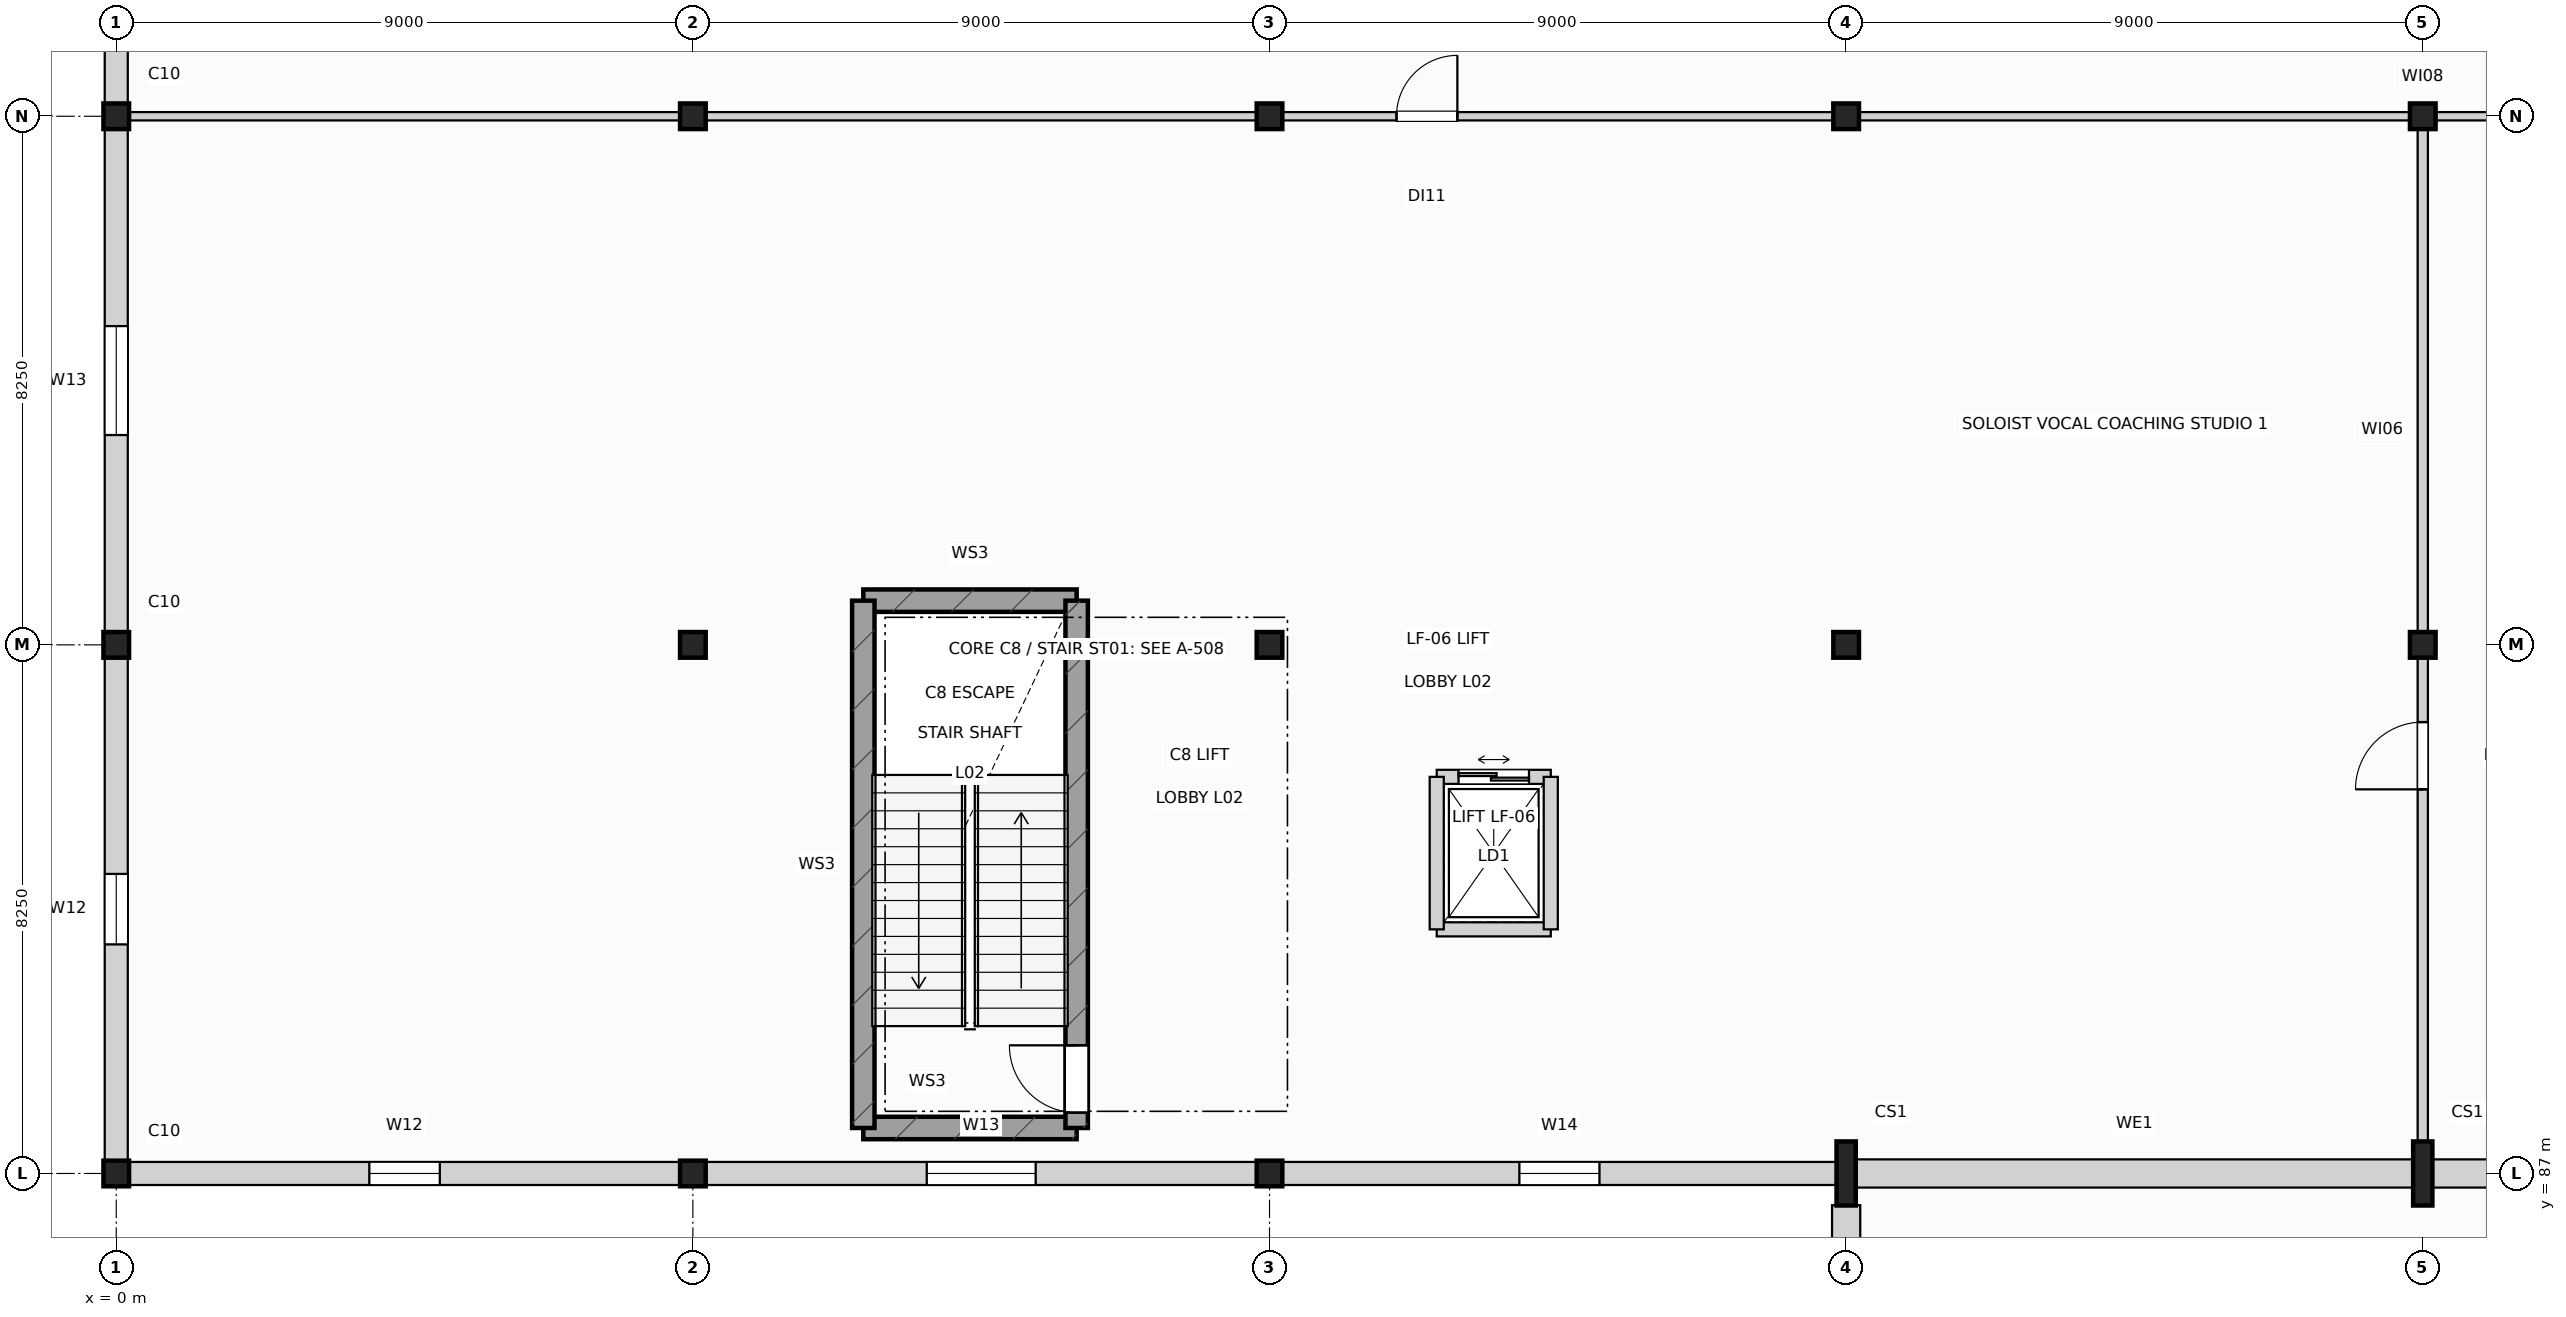
"""IFC4 building model, lengths in metres.
Left out: names, types, materials, properties, quantities, classifications, styles, units other than length and angle.
Written with IfcOpenShell. Run it as: python <this file> out.ifc"""

import sys

from ifc_helpers import new_model, si_unit, direction, frame, frame_2d, origin, origin_2d, place, context, subcontext, project, spatial, rectangle, i_section, extrude, element, fill, save


model = new_model("IFC4")
c1 = context("Model", 3, precision=1e-05, world=origin(), true_north=direction((0.0, 1.0)))
c2 = subcontext(c1, "Body", "Model", "MODEL_VIEW")
j1 = project(units=[si_unit("LENGTHUNIT", "METRE"), si_unit("PLANEANGLEUNIT", "RADIAN")], contexts=[c1])
p1 = place(None, origin())
s1 = spatial("IfcSite", under=j1, at=p1, CompositionType="ELEMENT")
p2 = place(p1, origin())
s2 = spatial("IfcBuilding", under=s1, at=p2, CompositionType="ELEMENT")
p3 = place(p2, frame((0.0, 0.0, 11.4)))
s3 = spatial("IfcBuildingStorey", under=s2, at=p3, CompositionType="ELEMENT", Elevation=11.4)
for number, where, z_axis, x_axis in (
    (1, (0.0, 87.0, 0.0), (0.0, 0.0, 1.0), (1.0, 0.0, 0.0)),
    (2, (0.0, 95.25, 0.0), (0.0, 0.0, 1.0), (1.0, 0.0, 0.0)),
    (3, (0.0, 103.5, 0.0), (0.0, 0.0, 1.0), (1.0, 0.0, 0.0)),
    (4, (9.0, 87.0, 0.0), (0.0, 0.0, 1.0), (1.0, 0.0, 0.0)),
    (5, (9.0, 95.25, 0.0), (0.0, 0.0, 1.0), (1.0, 0.0, 0.0)),
    (6, (9.0, 103.5, 0.0), (0.0, 0.0, 1.0), (1.0, 0.0, 0.0)),
    (7, (18.0, 87.0, 0.0), (0.0, 0.0, 1.0), (1.0, 0.0, 0.0)),
    (8, (18.0, 95.25, 0.0), (0.0, 0.0, 1.0), (1.0, 0.0, 0.0)),
    (9, (18.0, 103.5, 0.0), (0.0, 0.0, 1.0), (1.0, 0.0, 0.0)),
):
    element("IfcColumn", number, at=place(p3, frame(where, z_axis=z_axis, x_axis=x_axis)), inside=s3, PredefinedType="COLUMN", context=c2, shape_type="SweptSolid", body=[
        extrude(rectangle(XDim=0.4, YDim=0.4, at=origin_2d()), origin(), (0.0, 0.0, 1.0), 5.4),
    ])
p4 = place(p3, frame((27.0, 87.0, 0.0), z_axis=(0.0, 0.0, 1.0), x_axis=(1.0, 0.0, 0.0)))
e10 = element("IfcColumn", 10, at=p4, inside=s3, PredefinedType="COLUMN", context=c2, shape_type="SweptSolid", body=[
    extrude(i_section(OverallWidth=0.3, OverallDepth=1.0, WebThickness=0.019, FlangeThickness=0.036, at=origin_2d()), origin(), (0.0, 0.0, 1.0), 5.4),
])
for number, where, z_axis, x_axis in (
    (11, (27.0, 95.25, 0.0), (0.0, 0.0, 1.0), (1.0, 0.0, 0.0)),
    (12, (27.0, 103.5, 0.0), (0.0, 0.0, 1.0), (1.0, 0.0, 0.0)),
):
    element("IfcColumn", number, at=place(p3, frame(where, z_axis=z_axis, x_axis=x_axis)), inside=s3, PredefinedType="COLUMN", context=c2, shape_type="SweptSolid", body=[
        extrude(rectangle(XDim=0.4, YDim=0.4, at=origin_2d()), origin(), (0.0, 0.0, 1.0), 5.4),
    ])
p5 = place(p3, frame((36.0, 87.0, 0.0), z_axis=(0.0, 0.0, 1.0), x_axis=(1.0, 0.0, 0.0)))
e13 = element("IfcColumn", 13, at=p5, inside=s3, PredefinedType="COLUMN", context=c2, shape_type="SweptSolid", body=[
    extrude(i_section(OverallWidth=0.3, OverallDepth=1.0, WebThickness=0.019, FlangeThickness=0.036, at=origin_2d()), origin(), (0.0, 0.0, 1.0), 5.4),
])
for number, where, z_axis, x_axis in (
    (14, (36.0, 95.25, 0.0), (0.0, 0.0, 1.0), (1.0, 0.0, 0.0)),
    (15, (36.0, 103.5, 0.0), (0.0, 0.0, 1.0), (1.0, 0.0, 0.0)),
):
    element("IfcColumn", number, at=place(p3, frame(where, z_axis=z_axis, x_axis=x_axis)), inside=s3, PredefinedType="COLUMN", context=c2, shape_type="SweptSolid", body=[
        extrude(rectangle(XDim=0.4, YDim=0.4, at=origin_2d()), origin(), (0.0, 0.0, 1.0), 5.4),
    ])
p6 = place(p3, frame((27.145, 87.0, 0.0), z_axis=(0.0, 0.0, 1.0), x_axis=(1.0, 0.0, 0.0)))
e16 = element("IfcWall", 16, at=p6, inside=s3, PredefinedType="SOLIDWALL", context=c2, shape_type="SweptSolid", body=[
    extrude(rectangle(XDim=8.71, YDim=0.44, at=frame_2d((4.355, 0.0))), origin(), (0.0, 0.0, 1.0), 4.425),
])
p7 = place(p3, frame((36.145, 87.0, 0.0), z_axis=(0.0, 0.0, 1.0), x_axis=(1.0, 0.0, 0.0)))
e17 = element("IfcWall", 17, at=p7, inside=s3, PredefinedType="SOLIDWALL", context=c2, shape_type="SweptSolid", body=[
    extrude(rectangle(XDim=8.71, YDim=0.44, at=frame_2d((4.355, 0.0))), origin(), (0.0, 0.0, 1.0), 4.385),
])
p8 = place(p7, frame((1.539, 0.0, 0.85)))
e18 = element("IfcOpeningElement", 18, at=p8, cuts=e17, PredefinedType="OPENING", context=c2, shape_type="SweptSolid", body=[
    extrude(rectangle(XDim=1.8, YDim=2.6, at=frame_2d((0.9, 1.3))), frame((0.0, 0.23, 0.0), z_axis=(0.0, -1.0, 0.0), x_axis=(1.0, 0.0, 0.0)), (0.0, 0.0, 1.0), 0.46),
])
p9 = place(p7, frame((5.371, 0.0, 0.85)))
e19 = element("IfcOpeningElement", 19, at=p9, cuts=e17, PredefinedType="OPENING", context=c2, shape_type="SweptSolid", body=[
    extrude(rectangle(XDim=1.8, YDim=2.6, at=frame_2d((0.9, 1.3))), frame((0.0, 0.23, 0.0), z_axis=(0.0, -1.0, 0.0), x_axis=(1.0, 0.0, 0.0)), (0.0, 0.0, 1.0), 0.46),
])
p10 = place(p3, frame((27.0, 86.505, 0.0), z_axis=(0.0, 0.0, 1.0), x_axis=(0.0, -1.0, 0.0)))
e20 = element("IfcWall", 20, at=p10, inside=s3, PredefinedType="SOLIDWALL", context=c2, shape_type="SweptSolid", body=[
    extrude(rectangle(XDim=8.01, YDim=0.44, at=frame_2d((4.005, 0.0))), origin(), (0.0, 0.0, 1.0), 4.475),
])
p11 = place(p3, frame((0.0, 95.055, 0.0), z_axis=(0.0, 0.0, 1.0), x_axis=(0.0, -1.0, 0.0)))
e21 = element("IfcWall", 21, at=p11, inside=s3, PredefinedType="SOLIDWALL", context=c2, shape_type="SweptSolid", body=[
    extrude(rectangle(XDim=7.86, YDim=0.36, at=frame_2d((3.93, 0.0))), origin(), (0.0, 0.0, 1.0), 4.185),
])
p12 = place(p11, frame((3.38, 0.0, 0.85)))
e22 = element("IfcOpeningElement", 22, at=p12, cuts=e21, PredefinedType="OPENING", context=c2, shape_type="SweptSolid", body=[
    extrude(rectangle(XDim=1.1, YDim=1.8, at=frame_2d((0.55, 0.9))), frame((0.0, 0.19, 0.0), z_axis=(0.0, -1.0, 0.0), x_axis=(1.0, 0.0, 0.0)), (0.0, 0.0, 1.0), 0.38),
])
p13 = place(p3, frame((0.0, 103.305, 0.0), z_axis=(0.0, 0.0, 1.0), x_axis=(0.0, -1.0, 0.0)))
e23 = element("IfcWall", 23, at=p13, inside=s3, PredefinedType="SOLIDWALL", context=c2, shape_type="SweptSolid", body=[
    extrude(rectangle(XDim=7.86, YDim=0.36, at=frame_2d((3.93, 0.0))), origin(), (0.0, 0.0, 1.0), 4.385),
])
p14 = place(p13, frame((3.08, 0.0, 0.85)))
e24 = element("IfcOpeningElement", 24, at=p14, cuts=e23, PredefinedType="OPENING", context=c2, shape_type="SweptSolid", body=[
    extrude(rectangle(XDim=1.7, YDim=2.15, at=frame_2d((0.85, 1.075))), frame((0.0, 0.19, 0.0), z_axis=(0.0, -1.0, 0.0), x_axis=(1.0, 0.0, 0.0)), (0.0, 0.0, 1.0), 0.38),
])
p15 = place(p3, frame((0.0, 111.555, 0.0), z_axis=(0.0, 0.0, 1.0), x_axis=(0.0, -1.0, 0.0)))
e25 = element("IfcWall", 25, at=p15, inside=s3, PredefinedType="SOLIDWALL", context=c2, shape_type="SweptSolid", body=[
    extrude(rectangle(XDim=7.86, YDim=0.36, at=frame_2d((3.93, 0.0))), origin(), (0.0, 0.0, 1.0), 4.485),
])
p16 = place(p15, frame((3.305, 0.0, 0.85)))
e26 = element("IfcOpeningElement", 26, at=p16, cuts=e25, PredefinedType="OPENING", context=c2, shape_type="SweptSolid", body=[
    extrude(rectangle(XDim=1.25, YDim=1.85, at=frame_2d((0.625, 0.925))), frame((0.0, 0.19, 0.0), z_axis=(0.0, -1.0, 0.0), x_axis=(1.0, 0.0, 0.0)), (0.0, 0.0, 1.0), 0.38),
])
p17 = place(p3, frame((8.805, 87.0, 0.0), z_axis=(0.0, 0.0, 1.0), x_axis=(-1.0, 0.0, 0.0)))
e27 = element("IfcWall", 27, at=p17, inside=s3, PredefinedType="SOLIDWALL", context=c2, shape_type="SweptSolid", body=[
    extrude(rectangle(XDim=8.61, YDim=0.36, at=frame_2d((4.305, 0.0))), origin(), (0.0, 0.0, 1.0), 4.185),
])
p18 = place(p17, frame((3.755, 0.0, 0.85)))
e28 = element("IfcOpeningElement", 28, at=p18, cuts=e27, PredefinedType="OPENING", context=c2, shape_type="SweptSolid", body=[
    extrude(rectangle(XDim=1.1, YDim=1.8, at=frame_2d((0.55, 0.9))), frame((0.0, 0.19, 0.0), z_axis=(0.0, -1.0, 0.0), x_axis=(1.0, 0.0, 0.0)), (0.0, 0.0, 1.0), 0.38),
])
p19 = place(p3, frame((17.805, 87.0, 0.0), z_axis=(0.0, 0.0, 1.0), x_axis=(-1.0, 0.0, 0.0)))
e29 = element("IfcWall", 29, at=p19, inside=s3, PredefinedType="SOLIDWALL", context=c2, shape_type="SweptSolid", body=[
    extrude(rectangle(XDim=8.61, YDim=0.36, at=frame_2d((4.305, 0.0))), origin(), (0.0, 0.0, 1.0), 4.185),
])
p20 = place(p19, frame((3.455, 0.0, 0.85)))
e30 = element("IfcOpeningElement", 30, at=p20, cuts=e29, PredefinedType="OPENING", context=c2, shape_type="SweptSolid", body=[
    extrude(rectangle(XDim=1.7, YDim=2.15, at=frame_2d((0.85, 1.075))), frame((0.0, 0.19, 0.0), z_axis=(0.0, -1.0, 0.0), x_axis=(1.0, 0.0, 0.0)), (0.0, 0.0, 1.0), 0.38),
])
p21 = place(p3, frame((26.855, 87.0, 0.0), z_axis=(0.0, 0.0, 1.0), x_axis=(-1.0, 0.0, 0.0)))
e31 = element("IfcWall", 31, at=p21, inside=s3, PredefinedType="SOLIDWALL", context=c2, shape_type="SweptSolid", body=[
    extrude(rectangle(XDim=8.66, YDim=0.36, at=frame_2d((4.33, 0.0))), origin(), (0.0, 0.0, 1.0), 4.375),
])
p22 = place(p21, frame((3.705, 0.0, 0.85)))
e32 = element("IfcOpeningElement", 32, at=p22, cuts=e31, PredefinedType="OPENING", context=c2, shape_type="SweptSolid", body=[
    extrude(rectangle(XDim=1.25, YDim=1.85, at=frame_2d((0.625, 0.925))), frame((0.0, 0.19, 0.0), z_axis=(0.0, -1.0, 0.0), x_axis=(1.0, 0.0, 0.0)), (0.0, 0.0, 1.0), 0.38),
])
for number, where, z_axis, x_axis in (
    (33, (11.66, 87.71, 0.0), (0.0, 0.0, 1.0), (1.0, 0.0, 0.0)),
    (34, (11.66, 95.94, 0.0), (0.0, 0.0, 1.0), (1.0, 0.0, 0.0)),
):
    element("IfcWall", number, at=place(p3, frame(where, z_axis=z_axis, x_axis=x_axis)), inside=s3, PredefinedType="SHEAR", context=c2, shape_type="SweptSolid", body=[
        extrude(rectangle(XDim=3.33, YDim=0.35, at=frame_2d((1.665, 0.0))), origin(), (0.0, 0.0, 1.0), 5.12),
    ])
p23 = place(p3, frame((11.66, 87.71, 0.0), z_axis=(0.0, 0.0, 1.0), x_axis=(0.0, 1.0, 0.0)))
e35 = element("IfcWall", 35, at=p23, inside=s3, PredefinedType="SHEAR", context=c2, shape_type="SweptSolid", body=[
    extrude(rectangle(XDim=8.23, YDim=0.35, at=frame_2d((4.115, 0.0))), origin(), (0.0, 0.0, 1.0), 5.12),
])
p24 = place(p3, frame((14.99, 87.71, 0.0), z_axis=(0.0, 0.0, 1.0), x_axis=(0.0, 1.0, 0.0)))
e36 = element("IfcWall", 36, at=p24, inside=s3, PredefinedType="SHEAR", context=c2, shape_type="SweptSolid", body=[
    extrude(rectangle(XDim=8.23, YDim=0.35, at=frame_2d((4.115, 0.0))), origin(), (0.0, 0.0, 1.0), 5.12),
])
p25 = place(p24, frame((0.24, 0.0, 0.0)))
e37 = element("IfcOpeningElement", 37, at=p25, cuts=e36, PredefinedType="OPENING", context=c2, shape_type="SweptSolid", body=[
    extrude(rectangle(XDim=1.05, YDim=2.18, at=frame_2d((0.525, 1.09))), frame((0.0, 0.185, 0.0), z_axis=(0.0, -1.0, 0.0), x_axis=(1.0, 0.0, 0.0)), (0.0, 0.0, 1.0), 0.37),
])
p26 = place(p3, frame((20.61, 90.81, 0.0), z_axis=(0.0, 0.0, 1.0), x_axis=(1.0, 0.0, 0.0)))
e38 = element("IfcWall", 38, at=p26, inside=s3, PredefinedType="PARTITIONING", context=c2, shape_type="SweptSolid", body=[
    extrude(rectangle(XDim=1.78, YDim=0.22, at=frame_2d((0.89, 0.0))), origin(), (0.0, 0.0, 1.0), 5.085),
])
p27 = place(p3, frame((20.61, 93.19, 0.0), z_axis=(0.0, 0.0, 1.0), x_axis=(1.0, 0.0, 0.0)))
e39 = element("IfcWall", 39, at=p27, inside=s3, PredefinedType="PARTITIONING", context=c2, shape_type="SweptSolid", body=[
    extrude(rectangle(XDim=1.78, YDim=0.22, at=frame_2d((0.89, 0.0))), origin(), (0.0, 0.0, 1.0), 5.085),
])
p28 = place(p27, frame((0.34, 0.0, 0.0)))
e40 = element("IfcOpeningElement", 40, at=p28, cuts=e39, PredefinedType="OPENING", context=c2, shape_type="SweptSolid", body=[
    extrude(rectangle(XDim=1.1, YDim=2.18, at=frame_2d((0.55, 1.09))), frame((0.0, 0.12, 0.0), z_axis=(0.0, -1.0, 0.0), x_axis=(1.0, 0.0, 0.0)), (0.0, 0.0, 1.0), 0.24),
])
for number, where, z_axis, x_axis in (
    (41, (20.61, 90.81, 0.0), (0.0, 0.0, 1.0), (0.0, 1.0, 0.0)),
    (42, (22.39, 90.81, 0.0), (0.0, 0.0, 1.0), (0.0, 1.0, 0.0)),
):
    element("IfcWall", number, at=place(p3, frame(where, z_axis=z_axis, x_axis=x_axis)), inside=s3, PredefinedType="PARTITIONING", context=c2, shape_type="SweptSolid", body=[
        extrude(rectangle(XDim=2.38, YDim=0.22, at=frame_2d((1.19, 0.0))), origin(), (0.0, 0.0, 1.0), 4.725),
    ])
p29 = place(p3, frame((36.0, 87.2, 0.0), z_axis=(0.0, 0.0, 1.0), x_axis=(0.0, 1.0, 0.0)))
e43 = element("IfcWall", 43, at=p29, inside=s3, PredefinedType="PARTITIONING", context=c2, shape_type="SweptSolid", body=[
    extrude(rectangle(XDim=16.3, YDim=0.16, at=frame_2d((8.15, 0.0))), origin(), (0.0, 0.0, 1.0), 4.175),
])
p30 = place(p29, frame((5.795, 0.0, 0.0)))
e44 = element("IfcOpeningElement", 44, at=p30, cuts=e43, PredefinedType="OPENING", context=c2, shape_type="SweptSolid", body=[
    extrude(rectangle(XDim=1.05, YDim=2.12, at=frame_2d((0.525, 1.06))), frame((0.0, 0.09, 0.0), z_axis=(0.0, -1.0, 0.0), x_axis=(1.0, 0.0, 0.0)), (0.0, 0.0, 1.0), 0.18),
])
p31 = place(p3, frame((0.2, 103.5, 0.0), z_axis=(0.0, 0.0, 1.0), x_axis=(1.0, 0.0, 0.0)))
e45 = element("IfcWall", 45, at=p31, inside=s3, PredefinedType="PARTITIONING", context=c2, shape_type="SweptSolid", body=[
    extrude(rectangle(XDim=71.6, YDim=0.13, at=frame_2d((35.8, 0.0))), origin(), (0.0, 0.0, 1.0), 4.475),
])
p32 = place(p31, frame((19.782, 0.0, 0.0)))
e46 = element("IfcOpeningElement", 46, at=p32, cuts=e45, PredefinedType="OPENING", context=c2, shape_type="SweptSolid", body=[
    extrude(rectangle(XDim=0.95, YDim=2.1, at=frame_2d((0.475, 1.05))), frame((0.0, 0.075, 0.0), z_axis=(0.0, -1.0, 0.0), x_axis=(1.0, 0.0, 0.0)), (0.0, 0.0, 1.0), 0.15),
])
p33 = place(p12, origin())
e47 = element("IfcWindow", 47, at=p33, inside=s3, PartitioningType="SINGLE_PANEL", PredefinedType="WINDOW", context=c2, shape_type="SweptSolid", body=[
    extrude(rectangle(XDim=1.1, YDim=1.8, at=frame_2d((0.55, 0.9))), frame((0.0, 0.03, 0.0), z_axis=(0.0, -1.0, 0.0), x_axis=(1.0, 0.0, 0.0)), (0.0, 0.0, 1.0), 0.06),
])
fill(e22, e47)
p34 = place(p14, origin())
e48 = element("IfcWindow", 48, at=p34, inside=s3, PartitioningType="SINGLE_PANEL", PredefinedType="WINDOW", context=c2, shape_type="SweptSolid", body=[
    extrude(rectangle(XDim=1.7, YDim=2.15, at=frame_2d((0.85, 1.075))), frame((0.0, 0.03, 0.0), z_axis=(0.0, -1.0, 0.0), x_axis=(1.0, 0.0, 0.0)), (0.0, 0.0, 1.0), 0.06),
])
fill(e24, e48)
p35 = place(p18, origin())
e49 = element("IfcWindow", 49, at=p35, inside=s3, PartitioningType="SINGLE_PANEL", PredefinedType="WINDOW", context=c2, shape_type="SweptSolid", body=[
    extrude(rectangle(XDim=1.1, YDim=1.8, at=frame_2d((0.55, 0.9))), frame((0.0, 0.03, 0.0), z_axis=(0.0, -1.0, 0.0), x_axis=(1.0, 0.0, 0.0)), (0.0, 0.0, 1.0), 0.06),
])
fill(e28, e49)
p36 = place(p20, origin())
e50 = element("IfcWindow", 50, at=p36, inside=s3, PartitioningType="SINGLE_PANEL", PredefinedType="WINDOW", context=c2, shape_type="SweptSolid", body=[
    extrude(rectangle(XDim=1.7, YDim=2.15, at=frame_2d((0.85, 1.075))), frame((0.0, 0.03, 0.0), z_axis=(0.0, -1.0, 0.0), x_axis=(1.0, 0.0, 0.0)), (0.0, 0.0, 1.0), 0.06),
])
fill(e30, e50)
p37 = place(p22, origin())
e51 = element("IfcWindow", 51, at=p37, inside=s3, PartitioningType="SINGLE_PANEL", PredefinedType="WINDOW", context=c2, shape_type="SweptSolid", body=[
    extrude(rectangle(XDim=1.25, YDim=1.85, at=frame_2d((0.625, 0.925))), frame((0.0, 0.03, 0.0), z_axis=(0.0, -1.0, 0.0), x_axis=(1.0, 0.0, 0.0)), (0.0, 0.0, 1.0), 0.06),
])
fill(e32, e51)
p38 = place(p25, origin())
e52 = element("IfcDoor", 52, at=p38, inside=s3, OperationType="SINGLE_SWING_RIGHT", PredefinedType="DOOR", context=c2, shape_type="SweptSolid", body=[
    extrude(rectangle(XDim=1.05, YDim=2.18, at=frame_2d((0.525, 1.09))), frame((0.0, 0.025, 0.0), z_axis=(0.0, -1.0, 0.0), x_axis=(1.0, 0.0, 0.0)), (0.0, 0.0, 1.0), 0.05),
])
fill(e37, e52)
p39 = place(p28, origin())
e53 = element("IfcDoor", 53, at=p39, inside=s3, OperationType="DOUBLE_DOOR_SLIDING", PredefinedType="DOOR", context=c2, shape_type="SweptSolid", body=[
    extrude(rectangle(XDim=1.1, YDim=2.18, at=frame_2d((0.55, 1.09))), frame((0.0, 0.025, 0.0), z_axis=(0.0, -1.0, 0.0), x_axis=(1.0, 0.0, 0.0)), (0.0, 0.0, 1.0), 0.05),
])
fill(e40, e53)
p40 = place(p30, origin())
e54 = element("IfcDoor", 54, at=p40, inside=s3, OperationType="SINGLE_SWING_LEFT", PredefinedType="DOOR", context=c2, shape_type="SweptSolid", body=[
    extrude(rectangle(XDim=1.05, YDim=2.12, at=frame_2d((0.525, 1.06))), frame((0.0, 0.025, 0.0), z_axis=(0.0, -1.0, 0.0), x_axis=(1.0, 0.0, 0.0)), (0.0, 0.0, 1.0), 0.05),
])
fill(e44, e54)
p41 = place(p32, origin())
e55 = element("IfcDoor", 55, at=p41, inside=s3, OperationType="SINGLE_SWING_RIGHT", PredefinedType="DOOR", context=c2, shape_type="SweptSolid", body=[
    extrude(rectangle(XDim=0.95, YDim=2.1, at=frame_2d((0.475, 1.05))), frame((0.0, 0.025, 0.0), z_axis=(0.0, -1.0, 0.0), x_axis=(1.0, 0.0, 0.0)), (0.0, 0.0, 1.0), 0.05),
])
fill(e46, e55)
save(model, sys.argv[1])
